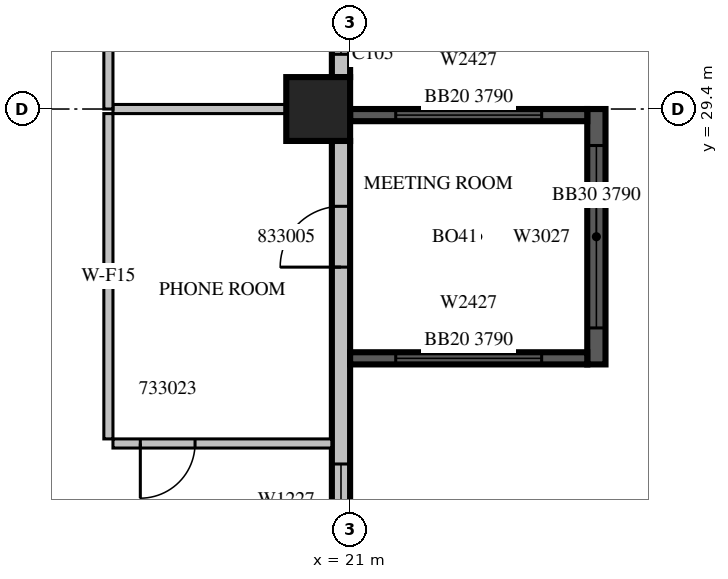
"""IFC4 building model, lengths in metres.
Left out: names, types, materials, properties, quantities, classifications, styles, units other than length and angle.
Written with IfcOpenShell. Run it as: python <this file> out.ifc"""

import sys

from ifc_helpers import new_model, si_unit, direction, frame, frame_2d, origin, origin_2d, place, context, subcontext, project, spatial, rectangle, extrude, source, transform, mapped, element, fill, save


model = new_model("IFC4")
c1 = context("Model", 3, precision=1e-05, world=origin(), true_north=direction((0.0, 1.0)))
c2 = subcontext(c1, "Body", "Model", "MODEL_VIEW")
j1 = project(units=[si_unit("LENGTHUNIT", "METRE"), si_unit("PLANEANGLEUNIT", "RADIAN")], contexts=[c1])
p1 = place(None, origin())
s1 = spatial("IfcSite", under=j1, at=p1, CompositionType="ELEMENT")
p2 = place(p1, origin())
s2 = spatial("IfcBuilding", under=s1, at=p2, CompositionType="ELEMENT")
p3 = place(p2, frame((0.0, 0.0, 149.7)))
s3 = spatial("IfcBuildingStorey", under=s2, at=p3, CompositionType="ELEMENT", Elevation=149.7)
m1 = source(origin(), c2, "Body", "SweptSolid", [
    extrude(rectangle(XDim=1.05, YDim=1.05, at=origin_2d()), origin(), (0.0, 0.0, 1.0), 4.2),
])
p4 = place(p3, frame((20.475, 29.4, 0.0), z_axis=(0.0, 0.0, 1.0), x_axis=(1.0, 0.0, 0.0)))
e1 = element("IfcColumn", 1, at=p4, inside=s3, PredefinedType="COLUMN", context=c2, shape_type="MappedRepresentation", body=[
    mapped(m1, transform((0.0, 0.0, 0.0), scale=1.0)),
])
m2 = source(origin(), c2, "Body", "SweptSolid", [
    extrude(rectangle(XDim=6.875, YDim=0.3, at=frame_2d((3.438, 0.0))), origin(), (0.0, 0.0, 1.0), 3.8),
])
p5 = place(p3, frame((20.85, 22.0, 0.0), z_axis=(0.0, 0.0, 1.0), x_axis=(0.0, 1.0, 0.0)))
e2 = element("IfcWall", 2, at=p5, inside=s3, PredefinedType="STANDARD", context=c2, shape_type="MappedRepresentation", body=[
    mapped(m2, transform((0.0, 0.0, 0.0), scale=1.0)),
])
m3 = source(origin(), c2, "Body", "SweptSolid", [
    extrude(rectangle(XDim=1.2, YDim=2.7, at=frame_2d((0.6, 1.35))), frame((0.0, 0.16, 0.0), z_axis=(0.0, -1.0, 0.0), x_axis=(1.0, 0.0, 0.0)), (0.0, 0.0, 1.0), 0.32),
])
p6 = place(p5, frame((0.362, 0.0, 0.6)))
e3 = element("IfcOpeningElement", 3, at=p6, cuts=e2, PredefinedType="OPENING", context=c2, shape_type="MappedRepresentation", body=[
    mapped(m3, transform((0.0, 0.0, 0.0), scale=1.0)),
])
m4 = source(origin(), c2, "Body", "SweptSolid", [
    extrude(rectangle(XDim=1.0, YDim=2.1, at=frame_2d((0.5, 1.05))), frame((0.0, 0.16, 0.0), z_axis=(0.0, -1.0, 0.0), x_axis=(1.0, 0.0, 0.0)), (0.0, 0.0, 1.0), 0.32),
])
p7 = place(p5, frame((4.8, 0.0, 0.0)))
e4 = element("IfcOpeningElement", 4, at=p7, cuts=e2, PredefinedType="OPENING", context=c2, shape_type="MappedRepresentation", body=[
    mapped(m4, transform((0.0, 0.0, 0.0), scale=1.0)),
])
m5 = source(origin(), c2, "Body", "SweptSolid", [
    extrude(rectangle(XDim=7.35, YDim=0.3, at=frame_2d((3.675, 0.0))), origin(), (0.0, 0.0, 1.0), 3.8),
])
p8 = place(p3, frame((20.85, 29.925, 0.0), z_axis=(0.0, 0.0, 1.0), x_axis=(0.0, 1.0, 0.0)))
e5 = element("IfcWall", 5, at=p8, inside=s3, PredefinedType="STANDARD", context=c2, shape_type="MappedRepresentation", body=[
    mapped(m5, transform((0.0, 0.0, 0.0), scale=1.0)),
])
m6 = source(origin(), c2, "Body", "SweptSolid", [
    extrude(rectangle(XDim=2.4, YDim=2.7, at=frame_2d((1.2, 1.35))), frame((0.0, 0.16, 0.0), z_axis=(0.0, -1.0, 0.0), x_axis=(1.0, 0.0, 0.0)), (0.0, 0.0, 1.0), 0.32),
])
p9 = place(p8, frame((0.375, 0.0, 0.6)))
e6 = element("IfcOpeningElement", 6, at=p9, cuts=e5, PredefinedType="OPENING", context=c2, shape_type="MappedRepresentation", body=[
    mapped(m6, transform((0.0, 0.0, 0.0), scale=1.0)),
])
p10 = place(p8, frame((4.575, 0.0, 0.0)))
e7 = element("IfcOpeningElement", 7, at=p10, cuts=e5, PredefinedType="OPENING", context=c2, shape_type="MappedRepresentation", body=[
    mapped(m4, transform((0.0, 0.0, 0.0), scale=1.0)),
])
m7 = source(origin(), c2, "Body", "SweptSolid", [
    extrude(rectangle(XDim=4.2, YDim=0.3, at=frame_2d((2.1, 0.0))), origin(), (0.0, 0.0, 1.0), 3.79),
])
p11 = place(p3, frame((25.05, 25.2, 0.0), z_axis=(0.0, 0.0, 1.0), x_axis=(0.0, 1.0, 0.0)))
e8 = element("IfcWall", 8, at=p11, inside=s3, PredefinedType="SOLIDWALL", context=c2, shape_type="MappedRepresentation", body=[
    mapped(m7, transform((0.0, 0.0, 0.0), scale=1.0)),
])
m8 = source(origin(), c2, "Body", "SweptSolid", [
    extrude(rectangle(XDim=3.0, YDim=2.7, at=frame_2d((1.5, 1.35))), frame((0.0, 0.16, 0.0), z_axis=(0.0, -1.0, 0.0), x_axis=(1.0, 0.0, 0.0)), (0.0, 0.0, 1.0), 0.32),
])
p12 = place(p11, frame((0.6, 0.0, 0.6)))
e9 = element("IfcOpeningElement", 9, at=p12, cuts=e8, PredefinedType="OPENING", context=c2, shape_type="MappedRepresentation", body=[
    mapped(m8, transform((0.0, 0.0, 0.0), scale=1.0)),
])
m9 = source(origin(), c2, "Body", "SweptSolid", [
    extrude(rectangle(XDim=3.9, YDim=0.2, at=frame_2d((1.95, 0.0))), origin(), (0.0, 0.0, 1.0), 3.79),
])
p13 = place(p3, frame((21.0, 25.3, 0.0), z_axis=(0.0, 0.0, 1.0), x_axis=(1.0, 0.0, 0.0)))
e10 = element("IfcWall", 10, at=p13, inside=s3, PredefinedType="SOLIDWALL", context=c2, shape_type="MappedRepresentation", body=[
    mapped(m9, transform((0.0, 0.0, 0.0), scale=1.0)),
])
m10 = source(origin(), c2, "Body", "SweptSolid", [
    extrude(rectangle(XDim=2.4, YDim=2.7, at=frame_2d((1.2, 1.35))), frame((0.0, 0.11, 0.0), z_axis=(0.0, -1.0, 0.0), x_axis=(1.0, 0.0, 0.0)), (0.0, 0.0, 1.0), 0.22),
])
p14 = place(p13, frame((0.75, 0.0, 0.6)))
e11 = element("IfcOpeningElement", 11, at=p14, cuts=e10, PredefinedType="OPENING", context=c2, shape_type="MappedRepresentation", body=[
    mapped(m10, transform((0.0, 0.0, 0.0), scale=1.0)),
])
p15 = place(p3, frame((21.0, 29.3, 0.0), z_axis=(0.0, 0.0, 1.0), x_axis=(1.0, 0.0, 0.0)))
e12 = element("IfcWall", 12, at=p15, inside=s3, PredefinedType="SOLIDWALL", context=c2, shape_type="MappedRepresentation", body=[
    mapped(m9, transform((0.0, 0.0, 0.0), scale=1.0)),
])
p16 = place(p15, frame((0.75, 0.0, 0.6)))
e13 = element("IfcOpeningElement", 13, at=p16, cuts=e12, PredefinedType="OPENING", context=c2, shape_type="MappedRepresentation", body=[
    mapped(m10, transform((0.0, 0.0, 0.0), scale=1.0)),
])
m11 = source(origin(), c2, "Body", "SweptSolid", [
    extrude(rectangle(XDim=3.6, YDim=0.15, at=frame_2d((1.8, 0.0))), origin(), (0.0, 0.0, 1.0), 3.8),
])
p17 = place(p3, frame((17.1, 23.9, 0.0), z_axis=(0.0, 0.0, 1.0), x_axis=(1.0, 0.0, 0.0)))
e14 = element("IfcWall", 14, at=p17, inside=s3, PredefinedType="PARTITIONING", context=c2, shape_type="MappedRepresentation", body=[
    mapped(m11, transform((0.0, 0.0, 0.0), scale=1.0)),
])
m12 = source(origin(), c2, "Body", "SweptSolid", [
    extrude(rectangle(XDim=0.9, YDim=2.1, at=frame_2d((0.45, 1.05))), frame((0.0, 0.085, 0.0), z_axis=(0.0, -1.0, 0.0), x_axis=(1.0, 0.0, 0.0)), (0.0, 0.0, 1.0), 0.17),
])
p18 = place(p17, frame((0.45, 0.0, 0.0)))
e15 = element("IfcOpeningElement", 15, at=p18, cuts=e14, PredefinedType="OPENING", context=c2, shape_type="MappedRepresentation", body=[
    mapped(m12, transform((0.0, 0.0, 0.0), scale=1.0)),
])
m13 = source(origin(), c2, "Body", "SweptSolid", [
    extrude(rectangle(XDim=5.35, YDim=0.15, at=frame_2d((2.675, 0.0))), origin(), (0.0, 0.0, 1.0), 3.8),
])
p19 = place(p3, frame((17.025, 29.325, 0.0), z_axis=(0.0, 0.0, 1.0), x_axis=(0.0, -1.0, 0.0)))
e16 = element("IfcWall", 16, at=p19, inside=s3, PredefinedType="PARTITIONING", context=c2, shape_type="MappedRepresentation", body=[
    mapped(m13, transform((0.0, 0.0, 0.0), scale=1.0)),
])
m14 = source(origin(), c2, "Body", "SweptSolid", [
    extrude(rectangle(XDim=2.851, YDim=0.15, at=frame_2d((1.425, 0.0))), origin(), (0.0, 0.0, 1.0), 3.8),
])
p20 = place(p3, frame((19.951, 29.4, 0.0), z_axis=(0.0, 0.0, 1.0), x_axis=(-1.0, 0.0, 0.0)))
e17 = element("IfcWall", 17, at=p20, inside=s3, PredefinedType="PARTITIONING", context=c2, shape_type="MappedRepresentation", body=[
    mapped(m14, transform((0.0, 0.0, 0.0), scale=1.0)),
])
m15 = source(origin(), c2, "Body", "SweptSolid", [
    extrude(rectangle(XDim=19.86, YDim=0.15, at=frame_2d((9.93, 0.0))), origin(), (0.0, 0.0, 1.0), 3.8),
])
p21 = place(p3, frame((17.025, 49.26, 0.0), z_axis=(0.0, 0.0, 1.0), x_axis=(0.0, -1.0, 0.0)))
e18 = element("IfcWall", 18, at=p21, inside=s3, PredefinedType="PARTITIONING", context=c2, shape_type="MappedRepresentation", body=[
    mapped(m15, transform((0.0, 0.0, 0.0), scale=1.0)),
])
m16 = source(origin(), c2, "Body", "SweptSolid", [
    extrude(rectangle(XDim=1.0, YDim=2.1, at=frame_2d((0.5, 1.05))), frame((0.0, 0.085, 0.0), z_axis=(0.0, -1.0, 0.0), x_axis=(1.0, 0.0, 0.0)), (0.0, 0.0, 1.0), 0.17),
])
p22 = place(p21, frame((17.503, 0.0, 0.0)))
e19 = element("IfcOpeningElement", 19, at=p22, cuts=e18, PredefinedType="OPENING", context=c2, shape_type="MappedRepresentation", body=[
    mapped(m16, transform((0.0, 0.0, 0.0), scale=1.0)),
])
p23 = place(p21, frame((14.191, 0.0, 0.0)))
e20 = element("IfcOpeningElement", 20, at=p23, cuts=e18, PredefinedType="OPENING", context=c2, shape_type="MappedRepresentation", body=[
    mapped(m16, transform((0.0, 0.0, 0.0), scale=1.0)),
])
p24 = place(p21, frame((11.848, 0.0, 0.0)))
e21 = element("IfcOpeningElement", 21, at=p24, cuts=e18, PredefinedType="OPENING", context=c2, shape_type="MappedRepresentation", body=[
    mapped(m16, transform((0.0, 0.0, 0.0), scale=1.0)),
])
p25 = place(p21, frame((9.759, 0.0, 0.0)))
e22 = element("IfcOpeningElement", 22, at=p25, cuts=e18, PredefinedType="OPENING", context=c2, shape_type="MappedRepresentation", body=[
    mapped(m12, transform((0.0, 0.0, 0.0), scale=1.0)),
])
p26 = place(p21, frame((7.659, 0.0, 0.0)))
e23 = element("IfcOpeningElement", 23, at=p26, cuts=e18, PredefinedType="OPENING", context=c2, shape_type="MappedRepresentation", body=[
    mapped(m12, transform((0.0, 0.0, 0.0), scale=1.0)),
])
p27 = place(p21, frame((4.976, 0.0, 0.0)))
e24 = element("IfcOpeningElement", 24, at=p27, cuts=e18, PredefinedType="OPENING", context=c2, shape_type="MappedRepresentation", body=[
    mapped(m12, transform((0.0, 0.0, 0.0), scale=1.0)),
])
p28 = place(p21, frame((1.309, 0.0, 0.0)))
e25 = element("IfcOpeningElement", 25, at=p28, cuts=e18, PredefinedType="OPENING", context=c2, shape_type="MappedRepresentation", body=[
    mapped(m12, transform((0.0, 0.0, 0.0), scale=1.0)),
])
m17 = source(origin(), c2, "Body", "SweptSolid", [
    extrude(rectangle(XDim=1.2, YDim=2.7, at=frame_2d((0.6, 1.35))), frame((0.0, 0.03, 0.0), z_axis=(0.0, -1.0, 0.0), x_axis=(1.0, 0.0, 0.0)), (0.0, 0.0, 1.0), 0.06),
])
p29 = place(p6, origin())
e26 = element("IfcWindow", 26, at=p29, inside=s3, PartitioningType="SINGLE_PANEL", PredefinedType="WINDOW", context=c2, shape_type="MappedRepresentation", body=[
    mapped(m17, transform((0.0, 0.0, 0.0), scale=1.0)),
])
fill(e3, e26)
m18 = source(origin(), c2, "Body", "SweptSolid", [
    extrude(rectangle(XDim=2.4, YDim=2.7, at=frame_2d((1.2, 1.35))), frame((0.0, 0.03, 0.0), z_axis=(0.0, -1.0, 0.0), x_axis=(1.0, 0.0, 0.0)), (0.0, 0.0, 1.0), 0.06),
])
p30 = place(p9, origin())
e27 = element("IfcWindow", 27, at=p30, inside=s3, PartitioningType="SINGLE_PANEL", PredefinedType="WINDOW", context=c2, shape_type="MappedRepresentation", body=[
    mapped(m18, transform((0.0, 0.0, 0.0), scale=1.0)),
])
fill(e6, e27)
m19 = source(origin(), c2, "Body", "SweptSolid", [
    extrude(rectangle(XDim=3.0, YDim=2.7, at=frame_2d((1.5, 1.35))), frame((0.0, 0.03, 0.0), z_axis=(0.0, -1.0, 0.0), x_axis=(1.0, 0.0, 0.0)), (0.0, 0.0, 1.0), 0.06),
])
p31 = place(p12, origin())
e28 = element("IfcWindow", 28, at=p31, inside=s3, PartitioningType="SINGLE_PANEL", PredefinedType="WINDOW", context=c2, shape_type="MappedRepresentation", body=[
    mapped(m19, transform((0.0, 0.0, 0.0), scale=1.0)),
])
fill(e9, e28)
p32 = place(p14, origin())
e29 = element("IfcWindow", 29, at=p32, inside=s3, PartitioningType="SINGLE_PANEL", PredefinedType="WINDOW", context=c2, shape_type="MappedRepresentation", body=[
    mapped(m18, transform((0.0, 0.0, 0.0), scale=1.0)),
])
fill(e11, e29)
p33 = place(p16, origin())
e30 = element("IfcWindow", 30, at=p33, inside=s3, PartitioningType="SINGLE_PANEL", PredefinedType="WINDOW", context=c2, shape_type="MappedRepresentation", body=[
    mapped(m18, transform((0.0, 0.0, 0.0), scale=1.0)),
])
fill(e13, e30)
m20 = source(origin(), c2, "Body", "SweptSolid", [
    extrude(rectangle(XDim=0.9, YDim=2.1, at=frame_2d((0.45, 1.05))), frame((0.0, 0.025, 0.0), z_axis=(0.0, -1.0, 0.0), x_axis=(1.0, 0.0, 0.0)), (0.0, 0.0, 1.0), 0.05),
])
p34 = place(p18, origin())
e31 = element("IfcDoor", 31, at=p34, inside=s3, OperationType="SINGLE_SWING_RIGHT", PredefinedType="DOOR", context=c2, shape_type="MappedRepresentation", body=[
    mapped(m20, transform((0.0, 0.0, 0.0), scale=1.0)),
])
fill(e15, e31)
m21 = source(origin(), c2, "Body", "SweptSolid", [
    extrude(rectangle(XDim=1.0, YDim=2.1, at=frame_2d((0.5, 1.05))), frame((0.0, 0.025, 0.0), z_axis=(0.0, -1.0, 0.0), x_axis=(1.0, 0.0, 0.0)), (0.0, 0.0, 1.0), 0.05),
])
p35 = place(p7, origin())
e32 = element("IfcDoor", 32, at=p35, inside=s3, OperationType="SINGLE_SWING_LEFT", PredefinedType="DOOR", context=c2, shape_type="MappedRepresentation", body=[
    mapped(m21, transform((0.0, 0.0, 0.0), scale=1.0)),
])
fill(e4, e32)
save(model, sys.argv[1])
